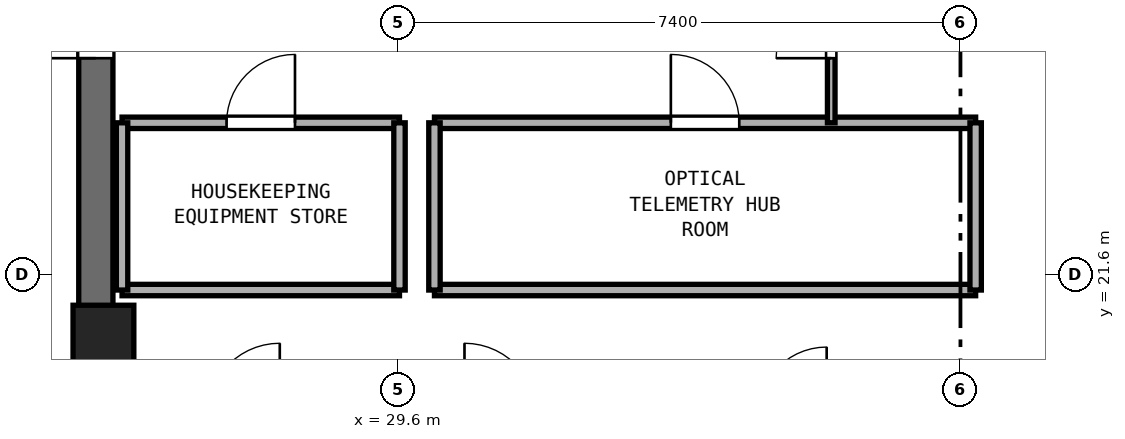
"""IFC4 building model, lengths in metres.
Left out: names, types, materials, properties, quantities, classifications, styles, units other than length and angle.
Written with IfcOpenShell. Run it as: python <this file> out.ifc"""

import sys

from ifc_helpers import new_model, si_unit, direction, frame, frame_2d, origin, origin_2d, place, context, subcontext, project, spatial, rectangle, extrude, element, fill, save


model = new_model("IFC4")
c1 = context("Model", 3, precision=1e-05, world=origin(), true_north=direction((0.0, 1.0)))
c2 = subcontext(c1, "Body", "Model", "MODEL_VIEW")
j1 = project(units=[si_unit("LENGTHUNIT", "METRE"), si_unit("PLANEANGLEUNIT", "RADIAN")], contexts=[c1])
p1 = place(None, origin())
s1 = spatial("IfcSite", under=j1, at=p1, CompositionType="ELEMENT")
p2 = place(p1, origin())
s2 = spatial("IfcBuilding", under=s1, at=p2, CompositionType="ELEMENT")
p3 = place(p2, frame((0.0, 0.0, 301.0)))
s3 = spatial("IfcBuildingStorey", under=s2, at=p3, CompositionType="ELEMENT", Elevation=301.0)
p4 = place(p3, frame((25.625, 17.45, 0.0), z_axis=(0.0, 0.0, 1.0), x_axis=(0.0, 1.0, 0.0)))
e1 = element("IfcWall", 1, at=p4, inside=s3, PredefinedType="SHEAR", context=c2, shape_type="SweptSolid", body=[
    extrude(rectangle(XDim=15.5, YDim=0.45, at=frame_2d((7.75, 0.0))), origin(), (0.0, 0.0, 1.0), 3.54),
])
p5 = place(p4, frame((7.0, 0.0, 0.0)))
e2 = element("IfcOpeningElement", 2, at=p5, cuts=e1, PredefinedType="OPENING", context=c2, shape_type="SweptSolid", body=[
    extrude(rectangle(XDim=1.5, YDim=2.15, at=frame_2d((0.75, 1.075))), frame((0.0, 0.235, 0.0), z_axis=(0.0, -1.0, 0.0), x_axis=(1.0, 0.0, 0.0)), (0.0, 0.0, 1.0), 0.47),
])
p6 = place(p3, frame((25.725, 20.8, 0.0), z_axis=(0.0, 0.0, 1.0), x_axis=(1.0, 0.0, 0.0)))
e3 = element("IfcColumn", 3, at=p6, inside=s3, PredefinedType="PILASTER", context=c2, shape_type="SweptSolid", body=[
    extrude(rectangle(XDim=0.8, YDim=0.8, at=origin_2d()), origin(), (0.0, 0.0, 1.0), 3.8),
])
p7 = place(p3, frame((25.97, 21.4, 0.0), z_axis=(0.0, 0.0, 1.0), x_axis=(1.0, 0.0, 0.0)))
e4 = element("IfcWall", 4, at=p7, inside=s3, PredefinedType="PARTITIONING", context=c2, shape_type="SweptSolid", body=[
    extrude(rectangle(XDim=3.65, YDim=0.15, at=frame_2d((1.825, 0.0))), origin(), (0.0, 0.0, 1.0), 3.54),
])
p8 = place(p3, frame((25.97, 23.6, 0.0), z_axis=(0.0, 0.0, 1.0), x_axis=(1.0, 0.0, 0.0)))
e5 = element("IfcWall", 5, at=p8, inside=s3, PredefinedType="PARTITIONING", context=c2, shape_type="SweptSolid", body=[
    extrude(rectangle(XDim=3.65, YDim=0.15, at=frame_2d((1.825, 0.0))), origin(), (0.0, 0.0, 1.0), 3.54),
])
p9 = place(p8, frame((1.375, 0.0, 0.0)))
e6 = element("IfcOpeningElement", 6, at=p9, cuts=e5, PredefinedType="OPENING", context=c2, shape_type="SweptSolid", body=[
    extrude(rectangle(XDim=0.9, YDim=2.1, at=frame_2d((0.45, 1.05))), frame((0.0, 0.085, 0.0), z_axis=(0.0, -1.0, 0.0), x_axis=(1.0, 0.0, 0.0)), (0.0, 0.0, 1.0), 0.17),
])
p10 = place(p3, frame((25.97, 21.4, 0.0), z_axis=(0.0, 0.0, 1.0), x_axis=(0.0, 1.0, 0.0)))
e7 = element("IfcWall", 7, at=p10, inside=s3, PredefinedType="PARTITIONING", context=c2, shape_type="SweptSolid", body=[
    extrude(rectangle(XDim=2.2, YDim=0.15, at=frame_2d((1.1, 0.0))), origin(), (0.0, 0.0, 1.0), 2.64),
])
p11 = place(p3, frame((29.62, 21.4, 0.0), z_axis=(0.0, 0.0, 1.0), x_axis=(0.0, 1.0, 0.0)))
e8 = element("IfcWall", 8, at=p11, inside=s3, PredefinedType="PARTITIONING", context=c2, shape_type="SweptSolid", body=[
    extrude(rectangle(XDim=2.2, YDim=0.15, at=frame_2d((1.1, 0.0))), origin(), (0.0, 0.0, 1.0), 3.54),
])
p12 = place(p3, frame((30.08, 21.4, 0.0), z_axis=(0.0, 0.0, 1.0), x_axis=(1.0, 0.0, 0.0)))
e9 = element("IfcWall", 9, at=p12, inside=s3, PredefinedType="PARTITIONING", context=c2, shape_type="SweptSolid", body=[
    extrude(rectangle(XDim=7.12, YDim=0.15, at=frame_2d((3.56, 0.0))), origin(), (0.0, 0.0, 1.0), 3.54),
])
p13 = place(p3, frame((30.08, 23.6, 0.0), z_axis=(0.0, 0.0, 1.0), x_axis=(1.0, 0.0, 0.0)))
e10 = element("IfcWall", 10, at=p13, inside=s3, PredefinedType="PARTITIONING", context=c2, shape_type="SweptSolid", body=[
    extrude(rectangle(XDim=7.12, YDim=0.15, at=frame_2d((3.56, 0.0))), origin(), (0.0, 0.0, 1.0), 3.54),
])
p14 = place(p13, frame((3.11, 0.0, 0.0)))
e11 = element("IfcOpeningElement", 11, at=p14, cuts=e10, PredefinedType="OPENING", context=c2, shape_type="SweptSolid", body=[
    extrude(rectangle(XDim=0.9, YDim=2.1, at=frame_2d((0.45, 1.05))), frame((0.0, 0.085, 0.0), z_axis=(0.0, -1.0, 0.0), x_axis=(1.0, 0.0, 0.0)), (0.0, 0.0, 1.0), 0.17),
])
for number, where, z_axis, x_axis in (
    (12, (30.08, 21.4, 0.0), (0.0, 0.0, 1.0), (0.0, 1.0, 0.0)),
    (13, (37.2, 21.4, 0.0), (0.0, 0.0, 1.0), (0.0, 1.0, 0.0)),
):
    element("IfcWall", number, at=place(p3, frame(where, z_axis=z_axis, x_axis=x_axis)), inside=s3, PredefinedType="PARTITIONING", context=c2, shape_type="SweptSolid", body=[
        extrude(rectangle(XDim=2.2, YDim=0.15, at=frame_2d((1.1, 0.0))), origin(), (0.0, 0.0, 1.0), 3.54),
    ])
p15 = place(p3, frame((35.3, 23.6, 0.0), z_axis=(0.0, 0.0, 1.0), x_axis=(0.0, 1.0, 0.0)))
e14 = element("IfcWall", 14, at=p15, inside=s3, PredefinedType="PARTITIONING", context=c2, shape_type="SweptSolid", body=[
    extrude(rectangle(XDim=3.2, YDim=0.1, at=frame_2d((1.6, 0.0))), origin(), (0.0, 0.0, 1.0), 3.54),
])
p16 = place(p15, frame((0.85, 0.0, 0.0)))
e15 = element("IfcOpeningElement", 15, at=p16, cuts=e14, PredefinedType="OPENING", context=c2, shape_type="SweptSolid", body=[
    extrude(rectangle(XDim=1.45, YDim=2.12, at=frame_2d((0.725, 1.06))), frame((0.0, 0.06, 0.0), z_axis=(0.0, -1.0, 0.0), x_axis=(1.0, 0.0, 0.0)), (0.0, 0.0, 1.0), 0.12),
])
p17 = place(p5, origin())
e16 = element("IfcDoor", 16, at=p17, inside=s3, OperationType="DOUBLE_DOOR_SINGLE_SWING", PredefinedType="DOOR", context=c2, shape_type="SweptSolid", body=[
    extrude(rectangle(XDim=1.5, YDim=2.15, at=frame_2d((0.75, 1.075))), frame((0.0, 0.025, 0.0), z_axis=(0.0, -1.0, 0.0), x_axis=(1.0, 0.0, 0.0)), (0.0, 0.0, 1.0), 0.05),
])
fill(e2, e16)
p18 = place(p9, origin())
e17 = element("IfcDoor", 17, at=p18, inside=s3, OperationType="SINGLE_SWING_RIGHT", PredefinedType="DOOR", context=c2, shape_type="SweptSolid", body=[
    extrude(rectangle(XDim=0.9, YDim=2.1, at=frame_2d((0.45, 1.05))), frame((0.0, 0.025, 0.0), z_axis=(0.0, -1.0, 0.0), x_axis=(1.0, 0.0, 0.0)), (0.0, 0.0, 1.0), 0.05),
])
fill(e6, e17)
p19 = place(p14, origin())
e18 = element("IfcDoor", 18, at=p19, inside=s3, OperationType="SINGLE_SWING_LEFT", PredefinedType="DOOR", context=c2, shape_type="SweptSolid", body=[
    extrude(rectangle(XDim=0.9, YDim=2.1, at=frame_2d((0.45, 1.05))), frame((0.0, 0.025, 0.0), z_axis=(0.0, -1.0, 0.0), x_axis=(1.0, 0.0, 0.0)), (0.0, 0.0, 1.0), 0.05),
])
fill(e11, e18)
p20 = place(p16, origin())
e19 = element("IfcDoor", 19, at=p20, inside=s3, OperationType="DOUBLE_DOOR_SINGLE_SWING", PredefinedType="DOOR", context=c2, shape_type="SweptSolid", body=[
    extrude(rectangle(XDim=1.45, YDim=2.12, at=frame_2d((0.725, 1.06))), frame((0.0, 0.025, 0.0), z_axis=(0.0, -1.0, 0.0), x_axis=(1.0, 0.0, 0.0)), (0.0, 0.0, 1.0), 0.05),
])
fill(e15, e19)
save(model, sys.argv[1])
